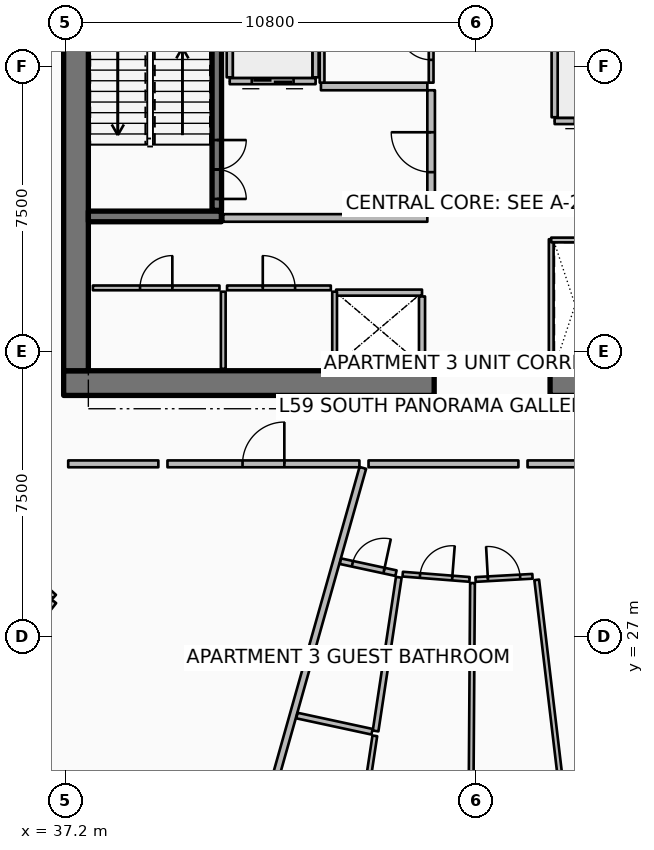
"""IFC4 building model, lengths in metres.
Left out: names, types, materials, properties, quantities, classifications, styles, units other than length and angle.
Written with IfcOpenShell. Run it as: python <this file> out.ifc"""

import sys

from ifc_helpers import new_model, si_unit, direction, frame, frame_2d, origin, place, context, subcontext, project, spatial, rectangle, extrude, element, fill, save


model = new_model("IFC4")
c1 = context("Model", 3, precision=1e-05, world=origin(), true_north=direction((0.0, 1.0)))
c2 = subcontext(c1, "Body", "Model", "MODEL_VIEW")
j1 = project(units=[si_unit("LENGTHUNIT", "METRE"), si_unit("PLANEANGLEUNIT", "RADIAN")], contexts=[c1])
p1 = place(None, origin())
s1 = spatial("IfcSite", under=j1, at=p1, CompositionType="ELEMENT")
p2 = place(p1, origin())
s2 = spatial("IfcBuilding", under=s1, at=p2, CompositionType="ELEMENT")
p3 = place(p2, frame((0.0, 0.0, 236.7)))
s3 = spatial("IfcBuildingStorey", under=s2, at=p3, CompositionType="ELEMENT", Elevation=236.7)
for number, where, z_axis, x_axis in (
    (1, (37.15, 33.675, 0.0), (0.0, 0.0, 1.0), (1.0, 0.0, 0.0)),
    (2, (49.95, 33.675, 0.0), (0.0, 0.0, 1.0), (1.0, 0.0, 0.0)),
):
    element("IfcWall", number, at=place(p3, frame(where, z_axis=z_axis, x_axis=x_axis)), inside=s3, PredefinedType="SHEAR", context=c2, shape_type="SweptSolid", body=[
        extrude(rectangle(XDim=9.75, YDim=0.65, at=frame_2d((4.875, 0.0))), origin(), (0.0, 0.0, 1.0), 3.85),
    ])
p4 = place(p3, frame((37.475, 34.0, 0.0), z_axis=(0.0, 0.0, 1.0), x_axis=(0.0, 1.0, 0.0)))
e3 = element("IfcWall", 3, at=p4, inside=s3, PredefinedType="SHEAR", context=c2, shape_type="SweptSolid", body=[
    extrude(rectangle(XDim=16.0, YDim=0.65, at=frame_2d((8.0, 0.0))), origin(), (0.0, 0.0, 1.0), 3.85),
])
p5 = place(p3, frame((37.8, 38.06, 0.0), z_axis=(0.0, 0.0, 1.0), x_axis=(1.0, 0.0, 0.0)))
e4 = element("IfcWall", 4, at=p5, inside=s3, PredefinedType="SHEAR", context=c2, shape_type="SweptSolid", body=[
    extrude(rectangle(XDim=3.5, YDim=0.28, at=frame_2d((1.75, 0.0))), origin(), (0.0, 0.0, 1.0), 3.85),
])
p6 = place(p3, frame((41.18, 38.22, 0.0), z_axis=(0.0, 0.0, 1.0), x_axis=(0.0, 1.0, 0.0)))
e5 = element("IfcWall", 5, at=p6, inside=s3, PredefinedType="SOLIDWALL", context=c2, shape_type="SweptSolid", body=[
    extrude(rectangle(XDim=7.56, YDim=0.25, at=frame_2d((3.78, 0.0))), origin(), (0.0, 0.0, 1.0), 3.59),
])
p7 = place(p6, frame((0.3, 0.0, 0.0)))
e6 = element("IfcOpeningElement", 6, at=p7, cuts=e5, PredefinedType="OPENING", context=c2, shape_type="SweptSolid", body=[
    extrude(rectangle(XDim=1.55, YDim=2.15, at=frame_2d((0.775, 1.075))), frame((0.0, 0.135, 0.0), z_axis=(0.0, -1.0, 0.0), x_axis=(1.0, 0.0, 0.0)), (0.0, 0.0, 1.0), 0.27),
])
p8 = place(p3, frame((44.32, 36.055, 0.0), z_axis=(0.0, 0.0, 1.0), x_axis=(1.0, 0.0, 0.0)))
e7 = element("IfcWall", 7, at=p8, inside=s3, PredefinedType="PARTITIONING", context=c2, shape_type="SweptSolid", body=[
    extrude(rectangle(XDim=2.26, YDim=0.16, at=frame_2d((1.13, 0.0))), origin(), (0.0, 0.0, 1.0), 3.59),
])
p9 = place(p3, frame((46.58, 34.245, 0.0), z_axis=(0.0, 0.0, 1.0), x_axis=(0.0, 1.0, 0.0)))
e8 = element("IfcWall", 8, at=p9, inside=s3, PredefinedType="PARTITIONING", context=c2, shape_type="SweptSolid", body=[
    extrude(rectangle(XDim=1.71, YDim=0.16, at=frame_2d((0.855, 0.0))), origin(), (0.0, 0.0, 1.0), 3.59),
])
p10 = place(p3, frame((43.78, 41.62, 0.0), z_axis=(0.0, 0.0, 1.0), x_axis=(-1.0, 0.0, 0.0)))
e9 = element("IfcWall", 9, at=p10, inside=s3, PredefinedType="PARTITIONING", context=c2, shape_type="SweptSolid", body=[
    extrude(rectangle(XDim=2.26, YDim=0.16, at=frame_2d((1.13, 0.0))), origin(), (0.0, 0.0, 1.0), 3.59),
])
p11 = place(p10, frame((0.58, 0.0, 0.0)))
e10 = element("IfcOpeningElement", 10, at=p11, cuts=e9, PredefinedType="OPENING", context=c2, shape_type="SweptSolid", body=[
    extrude(rectangle(XDim=1.1, YDim=2.1, at=frame_2d((0.55, 1.05))), frame((0.0, 0.09, 0.0), z_axis=(0.0, -1.0, 0.0), x_axis=(1.0, 0.0, 0.0)), (0.0, 0.0, 1.0), 0.18),
])
for number, where, z_axis, x_axis in (
    (11, (43.78, 41.72, 0.0), (0.0, 0.0, 1.0), (0.0, 1.0, 0.0)),
    (12, (41.52, 41.72, 0.0), (0.0, 0.0, 1.0), (0.0, 1.0, 0.0)),
):
    element("IfcWall", number, at=place(p3, frame(where, z_axis=z_axis, x_axis=x_axis)), inside=s3, PredefinedType="PARTITIONING", context=c2, shape_type="SweptSolid", body=[
        extrude(rectangle(XDim=2.26, YDim=0.16, at=frame_2d((1.13, 0.0))), origin(), (0.0, 0.0, 1.0), 3.59),
    ])
p12 = place(p3, frame((52.23, 40.57, 0.0), z_axis=(0.0, 0.0, 1.0), x_axis=(-1.0, 0.0, 0.0)))
e13 = element("IfcWall", 13, at=p12, inside=s3, PredefinedType="PARTITIONING", context=c2, shape_type="SweptSolid", body=[
    extrude(rectangle(XDim=2.16, YDim=0.16, at=frame_2d((1.08, 0.0))), origin(), (0.0, 0.0, 1.0), 3.59),
])
p13 = place(p12, frame((0.53, 0.0, 0.0)))
e14 = element("IfcOpeningElement", 14, at=p13, cuts=e13, PredefinedType="OPENING", context=c2, shape_type="SweptSolid", body=[
    extrude(rectangle(XDim=1.1, YDim=2.1, at=frame_2d((0.55, 1.05))), frame((0.0, 0.09, 0.0), z_axis=(0.0, -1.0, 0.0), x_axis=(1.0, 0.0, 0.0)), (0.0, 0.0, 1.0), 0.18),
])
p14 = place(p3, frame((50.07, 40.67, 0.0), z_axis=(0.0, 0.0, 1.0), x_axis=(0.0, 1.0, 0.0)))
e15 = element("IfcWall", 15, at=p14, inside=s3, PredefinedType="PARTITIONING", context=c2, shape_type="SweptSolid", body=[
    extrude(rectangle(XDim=2.16, YDim=0.16, at=frame_2d((1.08, 0.0))), origin(), (0.0, 0.0, 1.0), 3.59),
])
for number, where, z_axis, x_axis in (
    (16, (44.28, 34.05, 0.0), (0.0, 0.0, 1.0), (0.0, 1.0, 0.0)),
    (17, (41.35, 34.05, 0.0), (0.0, 0.0, 1.0), (0.0, 1.0, 0.0)),
):
    element("IfcWall", number, at=place(p3, frame(where, z_axis=z_axis, x_axis=x_axis)), inside=s3, PredefinedType="PARTITIONING", context=c2, shape_type="SweptSolid", body=[
        extrude(rectangle(XDim=2.03, YDim=0.125, at=frame_2d((1.015, 0.0))), origin(), (0.0, 0.0, 1.0), 3.03),
    ])
p15 = place(p3, frame((37.92, 36.18, 0.0), z_axis=(0.0, 0.0, 1.0), x_axis=(1.0, 0.0, 0.0)))
e18 = element("IfcWall", 18, at=p15, inside=s3, PredefinedType="PARTITIONING", context=c2, shape_type="SweptSolid", body=[
    extrude(rectangle(XDim=3.33, YDim=0.125, at=frame_2d((1.665, 0.0))), origin(), (0.0, 0.0, 1.0), 3.03),
])
p16 = place(p15, frame((1.24, 0.0, 0.0)))
e19 = element("IfcOpeningElement", 19, at=p16, cuts=e18, PredefinedType="OPENING", context=c2, shape_type="SweptSolid", body=[
    extrude(rectangle(XDim=0.85, YDim=2.06, at=frame_2d((0.425, 1.03))), frame((0.0, 0.073, 0.0), z_axis=(0.0, -1.0, 0.0), x_axis=(1.0, 0.0, 0.0)), (0.0, 0.0, 1.0), 0.145),
])
p17 = place(p3, frame((41.45, 36.18, 0.0), z_axis=(0.0, 0.0, 1.0), x_axis=(1.0, 0.0, 0.0)))
e20 = element("IfcWall", 20, at=p17, inside=s3, PredefinedType="PARTITIONING", context=c2, shape_type="SweptSolid", body=[
    extrude(rectangle(XDim=2.73, YDim=0.125, at=frame_2d((1.365, 0.0))), origin(), (0.0, 0.0, 1.0), 3.03),
])
p18 = place(p17, frame((0.94, 0.0, 0.0)))
e21 = element("IfcOpeningElement", 21, at=p18, cuts=e20, PredefinedType="OPENING", context=c2, shape_type="SweptSolid", body=[
    extrude(rectangle(XDim=0.85, YDim=2.06, at=frame_2d((0.425, 1.03))), frame((0.0, 0.073, 0.0), z_axis=(0.0, -1.0, 0.0), x_axis=(1.0, 0.0, 0.0)), (0.0, 0.0, 1.0), 0.145),
])
p19 = place(p3, frame((41.35, 38.02, 0.0), z_axis=(0.0, 0.0, 1.0), x_axis=(1.0, 0.0, 0.0)))
e22 = element("IfcWall", 22, at=p19, inside=s3, PredefinedType="PARTITIONING", context=c2, shape_type="SweptSolid", body=[
    extrude(rectangle(XDim=5.37, YDim=0.2, at=frame_2d((2.685, 0.0))), origin(), (0.0, 0.0, 1.0), 3.59),
])
p20 = place(p3, frame((43.92, 41.48, 0.0), z_axis=(0.0, 0.0, 1.0), x_axis=(1.0, 0.0, 0.0)))
e23 = element("IfcWall", 23, at=p20, inside=s3, PredefinedType="PARTITIONING", context=c2, shape_type="SweptSolid", body=[
    extrude(rectangle(XDim=2.8, YDim=0.2, at=frame_2d((1.4, 0.0))), origin(), (0.0, 0.0, 1.0), 3.59),
])
p21 = place(p3, frame((46.82, 38.12, 0.0), z_axis=(0.0, 0.0, 1.0), x_axis=(0.0, 1.0, 0.0)))
e24 = element("IfcWall", 24, at=p21, inside=s3, PredefinedType="PARTITIONING", context=c2, shape_type="SweptSolid", body=[
    extrude(rectangle(XDim=3.26, YDim=0.2, at=frame_2d((1.63, 0.0))), origin(), (0.0, 0.0, 1.0), 3.59),
])
p22 = place(p21, frame((1.105, 0.0, 0.0)))
e25 = element("IfcOpeningElement", 25, at=p22, cuts=e24, PredefinedType="OPENING", context=c2, shape_type="SweptSolid", body=[
    extrude(rectangle(XDim=1.05, YDim=2.1, at=frame_2d((0.525, 1.05))), frame((0.0, 0.11, 0.0), z_axis=(0.0, -1.0, 0.0), x_axis=(1.0, 0.0, 0.0)), (0.0, 0.0, 1.0), 0.22),
])
p23 = place(p3, frame((49.98, 34.06, 0.0), z_axis=(0.0, 0.0, 1.0), x_axis=(0.0, 1.0, 0.0)))
e26 = element("IfcWall", 26, at=p23, inside=s3, PredefinedType="PARTITIONING", context=c2, shape_type="SweptSolid", body=[
    extrude(rectangle(XDim=3.4, YDim=0.125, at=frame_2d((1.7, 0.0))), origin(), (0.0, 0.0, 1.0), 3.03),
])
p24 = place(p3, frame((49.98, 37.44, 0.0), z_axis=(0.0, 0.0, 1.0), x_axis=(1.0, 0.0, 0.0)))
e27 = element("IfcWall", 27, at=p24, inside=s3, PredefinedType="PARTITIONING", context=c2, shape_type="SweptSolid", body=[
    extrude(rectangle(XDim=1.26, YDim=0.125, at=frame_2d((0.63, 0.0))), origin(), (0.0, 0.0, 1.0), 3.03),
])
p25 = place(p3, frame((43.95, 41.58, 0.0), z_axis=(0.0, 0.0, 1.0), x_axis=(0.0, 1.0, 0.0)))
e28 = element("IfcWall", 28, at=p25, inside=s3, PredefinedType="PARTITIONING", context=c2, shape_type="SweptSolid", body=[
    extrude(rectangle(XDim=4.32, YDim=0.125, at=frame_2d((2.16, 0.0))), origin(), (0.0, 0.0, 1.0), 3.03),
])
p26 = place(p3, frame((46.82, 41.58, 0.0), z_axis=(0.0, 0.0, 1.0), x_axis=(0.0, 1.0, 0.0)))
e29 = element("IfcWall", 29, at=p26, inside=s3, PredefinedType="PARTITIONING", context=c2, shape_type="SweptSolid", body=[
    extrude(rectangle(XDim=2.05, YDim=0.125, at=frame_2d((1.025, 0.0))), origin(), (0.0, 0.0, 1.0), 3.03),
])
p27 = place(p26, frame((0.6, 0.0, 0.0)))
e30 = element("IfcOpeningElement", 30, at=p27, cuts=e29, PredefinedType="OPENING", context=c2, shape_type="SweptSolid", body=[
    extrude(rectangle(XDim=0.85, YDim=2.06, at=frame_2d((0.425, 1.03))), frame((0.0, 0.073, 0.0), z_axis=(0.0, -1.0, 0.0), x_axis=(1.0, 0.0, 0.0)), (0.0, 0.0, 1.0), 0.145),
])
p28 = place(p3, frame((45.023, 31.444, 0.0), z_axis=(0.0, 0.0, 1.0), x_axis=(-0.271442063103, -0.962454781472, 0.0)))
e31 = element("IfcWall", 31, at=p28, inside=s3, PredefinedType="PARTITIONING", context=c2, shape_type="SweptSolid", body=[
    extrude(rectangle(XDim=16.017, YDim=0.18, at=frame_2d((8.008, 0.0))), origin(), (0.0, 0.0, 1.0), 2.957),
])
p29 = place(p3, frame((39.882, 31.55, 0.0), z_axis=(0.0, 0.0, 1.0), x_axis=(1.0, 0.0, 0.0)))
e32 = element("IfcWall", 32, at=p29, inside=s3, PredefinedType="PARTITIONING", context=c2, shape_type="SweptSolid", body=[
    extrude(rectangle(XDim=5.051, YDim=0.18, at=frame_2d((2.525, 0.0))), origin(), (0.0, 0.0, 1.0), 2.957),
])
p30 = place(p29, frame((1.975, 0.0, 0.0)))
e33 = element("IfcOpeningElement", 33, at=p30, cuts=e32, PredefinedType="OPENING", context=c2, shape_type="SweptSolid", body=[
    extrude(rectangle(XDim=1.1, YDim=2.1, at=frame_2d((0.55, 1.05))), frame((0.0, 0.1, 0.0), z_axis=(0.0, -1.0, 0.0), x_axis=(1.0, 0.0, 0.0)), (0.0, 0.0, 1.0), 0.2),
])
p31 = place(p3, frame((37.27, 31.55, 0.0), z_axis=(0.0, 0.0, 1.0), x_axis=(1.0, 0.0, 0.0)))
e34 = element("IfcWall", 34, at=p31, inside=s3, PredefinedType="PARTITIONING", context=c2, shape_type="SweptSolid", body=[
    extrude(rectangle(XDim=2.372, YDim=0.18, at=frame_2d((1.186, 0.0))), origin(), (0.0, 0.0, 1.0), 2.957),
])
p32 = place(p3, frame((36.903, 27.924, 0.0), z_axis=(0.0, 0.0, 1.0), x_axis=(-0.619090039254, -0.785320013304, 0.0)))
e35 = element("IfcWall", 35, at=p32, inside=s3, PredefinedType="PARTITIONING", context=c2, shape_type="SweptSolid", body=[
    extrude(rectangle(XDim=11.672, YDim=0.125, at=frame_2d((5.836, 0.0))), origin(), (0.0, 0.0, 1.0), 2.957),
])
p33 = place(p3, frame((35.26, 29.542, 0.0), z_axis=(0.0, 0.0, 1.0), x_axis=(0.742286289791, -0.670082878447, 0.0)))
e36 = element("IfcWall", 36, at=p33, inside=s3, PredefinedType="PARTITIONING", context=c2, shape_type="SweptSolid", body=[
    extrude(rectangle(XDim=2.218, YDim=0.125, at=frame_2d((1.109, 0.0))), origin(), (0.0, 0.0, 1.0), 2.957),
])
p34 = place(p33, frame((0.684, 0.0, 0.0)))
e37 = element("IfcOpeningElement", 37, at=p34, cuts=e36, PredefinedType="OPENING", context=c2, shape_type="SweptSolid", body=[
    extrude(rectangle(XDim=0.85, YDim=2.06, at=frame_2d((0.425, 1.03))), frame((0.0, 0.073, 0.0), z_axis=(0.0, -1.0, 0.0), x_axis=(1.0, 0.0, 0.0)), (0.0, 0.0, 1.0), 0.145),
])
p35 = place(p3, frame((49.357, 31.55, 0.0), z_axis=(0.0, 0.0, 1.0), x_axis=(1.0, 0.0, 0.0)))
e38 = element("IfcWall", 38, at=p35, inside=s3, PredefinedType="PARTITIONING", context=c2, shape_type="SweptSolid", body=[
    extrude(rectangle(XDim=4.376, YDim=0.18, at=frame_2d((2.188, 0.0))), origin(), (0.0, 0.0, 1.0), 2.957),
])
p36 = place(p35, frame((1.638, 0.0, 0.0)))
e39 = element("IfcOpeningElement", 39, at=p36, cuts=e38, PredefinedType="OPENING", context=c2, shape_type="SweptSolid", body=[
    extrude(rectangle(XDim=1.1, YDim=2.1, at=frame_2d((0.55, 1.05))), frame((0.0, 0.1, 0.0), z_axis=(0.0, -1.0, 0.0), x_axis=(1.0, 0.0, 0.0)), (0.0, 0.0, 1.0), 0.2),
])
p37 = place(p3, frame((45.173, 31.55, 0.0), z_axis=(0.0, 0.0, 1.0), x_axis=(1.0, 0.0, 0.0)))
e40 = element("IfcWall", 40, at=p37, inside=s3, PredefinedType="PARTITIONING", context=c2, shape_type="SweptSolid", body=[
    extrude(rectangle(XDim=3.944, YDim=0.18, at=frame_2d((1.972, 0.0))), origin(), (0.0, 0.0, 1.0), 2.957),
])
p38 = place(p3, frame((49.598, 28.497, 0.0), z_axis=(0.0, 0.0, 1.0), x_axis=(0.117541965763, -0.99306791625, 0.0)))
e41 = element("IfcWall", 41, at=p38, inside=s3, PredefinedType="PARTITIONING", context=c2, shape_type="SweptSolid", body=[
    extrude(rectangle(XDim=11.098, YDim=0.125, at=frame_2d((5.549, 0.0))), origin(), (0.0, 0.0, 1.0), 2.957),
])
p39 = place(p3, frame((44.434, 28.989, 0.0), z_axis=(0.0, 0.0, 1.0), x_axis=(0.977543483976, -0.21073380587, 0.0)))
e42 = element("IfcWall", 42, at=p39, inside=s3, PredefinedType="PARTITIONING", context=c2, shape_type="SweptSolid", body=[
    extrude(rectangle(XDim=1.494, YDim=0.15, at=frame_2d((0.747, 0.0))), origin(), (0.0, 0.0, 1.0), 2.957),
])
p40 = place(p39, frame((0.322, 0.0, 0.0)))
e43 = element("IfcOpeningElement", 43, at=p40, cuts=e42, PredefinedType="OPENING", context=c2, shape_type="SweptSolid", body=[
    extrude(rectangle(XDim=0.85, YDim=2.06, at=frame_2d((0.425, 1.03))), frame((0.0, 0.085, 0.0), z_axis=(0.0, -1.0, 0.0), x_axis=(1.0, 0.0, 0.0)), (0.0, 0.0, 1.0), 0.17),
])
p41 = place(p3, frame((43.289, 24.927, 0.0), z_axis=(0.0, 0.0, 1.0), x_axis=(0.977523973404, -0.210824290395, 0.0)))
e44 = element("IfcWall", 44, at=p41, inside=s3, PredefinedType="PARTITIONING", context=c2, shape_type="SweptSolid", body=[
    extrude(rectangle(XDim=2.021, YDim=0.15, at=frame_2d((1.01, 0.0))), origin(), (0.0, 0.0, 1.0), 2.957),
])
p42 = place(p3, frame((45.969, 28.566, 0.0), z_axis=(0.0, 0.0, 1.0), x_axis=(-0.149464107942, -0.988767151779, 0.0)))
e45 = element("IfcWall", 45, at=p42, inside=s3, PredefinedType="PARTITIONING", context=c2, shape_type="SweptSolid", body=[
    extrude(rectangle(XDim=4.09, YDim=0.15, at=frame_2d((2.045, 0.0))), origin(), (0.0, 0.0, 1.0), 3.03),
])
p43 = place(p3, frame((45.339, 24.393, 0.0), z_axis=(0.0, 0.0, 1.0), x_axis=(-0.149441267911, -0.988770604056, 0.0)))
e46 = element("IfcWall", 46, at=p43, inside=s3, PredefinedType="PARTITIONING", context=c2, shape_type="SweptSolid", body=[
    extrude(rectangle(XDim=8.025, YDim=0.125, at=frame_2d((4.012, 0.0))), origin(), (0.0, 0.0, 1.0), 3.03),
])
p44 = place(p43, frame((3.587, 0.0, 0.0)))
e47 = element("IfcOpeningElement", 47, at=p44, cuts=e46, PredefinedType="OPENING", context=c2, shape_type="SweptSolid", body=[
    extrude(rectangle(XDim=0.85, YDim=2.06, at=frame_2d((0.425, 1.03))), frame((0.0, 0.073, 0.0), z_axis=(0.0, -1.0, 0.0), x_axis=(1.0, 0.0, 0.0)), (0.0, 0.0, 1.0), 0.145),
])
p45 = place(p3, frame((47.909, 28.413, 0.0), z_axis=(0.0, 0.0, 1.0), x_axis=(-0.006746473149, -0.999977242291, 0.0)))
e48 = element("IfcWall", 48, at=p45, inside=s3, PredefinedType="PARTITIONING", context=c2, shape_type="SweptSolid", body=[
    extrude(rectangle(XDim=11.399, YDim=0.125, at=frame_2d((5.7, 0.0))), origin(), (0.0, 0.0, 1.0), 3.03),
])
p46 = place(p3, frame((46.073, 28.648, 0.0), z_axis=(0.0, 0.0, 1.0), x_axis=(0.996920989634, -0.078412629257, 0.0)))
e49 = element("IfcWall", 49, at=p46, inside=s3, PredefinedType="PARTITIONING", context=c2, shape_type="SweptSolid", body=[
    extrude(rectangle(XDim=1.762, YDim=0.125, at=frame_2d((0.881, 0.0))), origin(), (0.0, 0.0, 1.0), 3.03),
])
p47 = place(p46, frame((0.456, 0.0, 0.0)))
e50 = element("IfcOpeningElement", 50, at=p47, cuts=e49, PredefinedType="OPENING", context=c2, shape_type="SweptSolid", body=[
    extrude(rectangle(XDim=0.85, YDim=2.06, at=frame_2d((0.425, 1.03))), frame((0.0, 0.073, 0.0), z_axis=(0.0, -1.0, 0.0), x_axis=(1.0, 0.0, 0.0)), (0.0, 0.0, 1.0), 0.145),
])
p48 = place(p3, frame((47.989, 28.508, 0.0), z_axis=(0.0, 0.0, 1.0), x_axis=(0.998458349177, 0.055506080383, 0.0)))
e51 = element("IfcWall", 51, at=p48, inside=s3, PredefinedType="PARTITIONING", context=c2, shape_type="SweptSolid", body=[
    extrude(rectangle(XDim=1.5, YDim=0.125, at=frame_2d((0.75, 0.0))), origin(), (0.0, 0.0, 1.0), 3.03),
])
p49 = place(p48, frame((0.325, 0.0, 0.0)))
e52 = element("IfcOpeningElement", 52, at=p49, cuts=e51, PredefinedType="OPENING", context=c2, shape_type="SweptSolid", body=[
    extrude(rectangle(XDim=0.85, YDim=2.06, at=frame_2d((0.425, 1.03))), frame((0.0, 0.073, 0.0), z_axis=(0.0, -1.0, 0.0), x_axis=(1.0, 0.0, 0.0)), (0.0, 0.0, 1.0), 0.145),
])
p50 = place(p7, origin())
e53 = element("IfcDoor", 53, at=p50, inside=s3, OperationType="DOUBLE_DOOR_SINGLE_SWING", PredefinedType="DOOR", context=c2, shape_type="SweptSolid", body=[
    extrude(rectangle(XDim=1.55, YDim=2.15, at=frame_2d((0.775, 1.075))), frame((0.0, 0.025, 0.0), z_axis=(0.0, -1.0, 0.0), x_axis=(1.0, 0.0, 0.0)), (0.0, 0.0, 1.0), 0.05),
])
fill(e6, e53)
p51 = place(p11, origin())
e54 = element("IfcDoor", 54, at=p51, inside=s3, OperationType="DOUBLE_DOOR_SLIDING", PredefinedType="DOOR", context=c2, shape_type="SweptSolid", body=[
    extrude(rectangle(XDim=1.1, YDim=2.1, at=frame_2d((0.55, 1.05))), frame((0.0, 0.025, 0.0), z_axis=(0.0, -1.0, 0.0), x_axis=(1.0, 0.0, 0.0)), (0.0, 0.0, 1.0), 0.05),
])
fill(e10, e54)
p52 = place(p16, origin())
e55 = element("IfcDoor", 55, at=p52, inside=s3, OperationType="SINGLE_SWING_RIGHT", PredefinedType="DOOR", context=c2, shape_type="SweptSolid", body=[
    extrude(rectangle(XDim=0.85, YDim=2.06, at=frame_2d((0.425, 1.03))), frame((0.0, 0.025, 0.0), z_axis=(0.0, -1.0, 0.0), x_axis=(1.0, 0.0, 0.0)), (0.0, 0.0, 1.0), 0.05),
])
fill(e19, e55)
p53 = place(p18, origin())
e56 = element("IfcDoor", 56, at=p53, inside=s3, OperationType="SINGLE_SWING_LEFT", PredefinedType="DOOR", context=c2, shape_type="SweptSolid", body=[
    extrude(rectangle(XDim=0.85, YDim=2.06, at=frame_2d((0.425, 1.03))), frame((0.0, 0.025, 0.0), z_axis=(0.0, -1.0, 0.0), x_axis=(1.0, 0.0, 0.0)), (0.0, 0.0, 1.0), 0.05),
])
fill(e21, e56)
p54 = place(p22, origin())
e57 = element("IfcDoor", 57, at=p54, inside=s3, OperationType="SINGLE_SWING_RIGHT", PredefinedType="DOOR", context=c2, shape_type="SweptSolid", body=[
    extrude(rectangle(XDim=1.05, YDim=2.1, at=frame_2d((0.525, 1.05))), frame((0.0, 0.025, 0.0), z_axis=(0.0, -1.0, 0.0), x_axis=(1.0, 0.0, 0.0)), (0.0, 0.0, 1.0), 0.05),
])
fill(e25, e57)
p55 = place(p27, origin())
e58 = element("IfcDoor", 58, at=p55, inside=s3, OperationType="SINGLE_SWING_RIGHT", PredefinedType="DOOR", context=c2, shape_type="SweptSolid", body=[
    extrude(rectangle(XDim=0.85, YDim=2.06, at=frame_2d((0.425, 1.03))), frame((0.0, 0.025, 0.0), z_axis=(0.0, -1.0, 0.0), x_axis=(1.0, 0.0, 0.0)), (0.0, 0.0, 1.0), 0.05),
])
fill(e30, e58)
p56 = place(p30, origin())
e59 = element("IfcDoor", 59, at=p56, inside=s3, OperationType="SINGLE_SWING_RIGHT", PredefinedType="DOOR", context=c2, shape_type="SweptSolid", body=[
    extrude(rectangle(XDim=1.1, YDim=2.1, at=frame_2d((0.55, 1.05))), frame((0.0, 0.025, 0.0), z_axis=(0.0, -1.0, 0.0), x_axis=(1.0, 0.0, 0.0)), (0.0, 0.0, 1.0), 0.05),
])
fill(e33, e59)
p57 = place(p40, origin())
e60 = element("IfcDoor", 60, at=p57, inside=s3, OperationType="SINGLE_SWING_RIGHT", PredefinedType="DOOR", context=c2, shape_type="SweptSolid", body=[
    extrude(rectangle(XDim=0.85, YDim=2.06, at=frame_2d((0.425, 1.03))), frame((0.0, 0.025, 0.0), z_axis=(0.0, -1.0, 0.0), x_axis=(1.0, 0.0, 0.0)), (0.0, 0.0, 1.0), 0.05),
])
fill(e43, e60)
p58 = place(p47, origin())
e61 = element("IfcDoor", 61, at=p58, inside=s3, OperationType="SINGLE_SWING_RIGHT", PredefinedType="DOOR", context=c2, shape_type="SweptSolid", body=[
    extrude(rectangle(XDim=0.85, YDim=2.06, at=frame_2d((0.425, 1.03))), frame((0.0, 0.025, 0.0), z_axis=(0.0, -1.0, 0.0), x_axis=(1.0, 0.0, 0.0)), (0.0, 0.0, 1.0), 0.05),
])
fill(e50, e61)
p59 = place(p49, origin())
e62 = element("IfcDoor", 62, at=p59, inside=s3, OperationType="SINGLE_SWING_LEFT", PredefinedType="DOOR", context=c2, shape_type="SweptSolid", body=[
    extrude(rectangle(XDim=0.85, YDim=2.06, at=frame_2d((0.425, 1.03))), frame((0.0, 0.025, 0.0), z_axis=(0.0, -1.0, 0.0), x_axis=(1.0, 0.0, 0.0)), (0.0, 0.0, 1.0), 0.05),
])
fill(e52, e62)
save(model, sys.argv[1])
